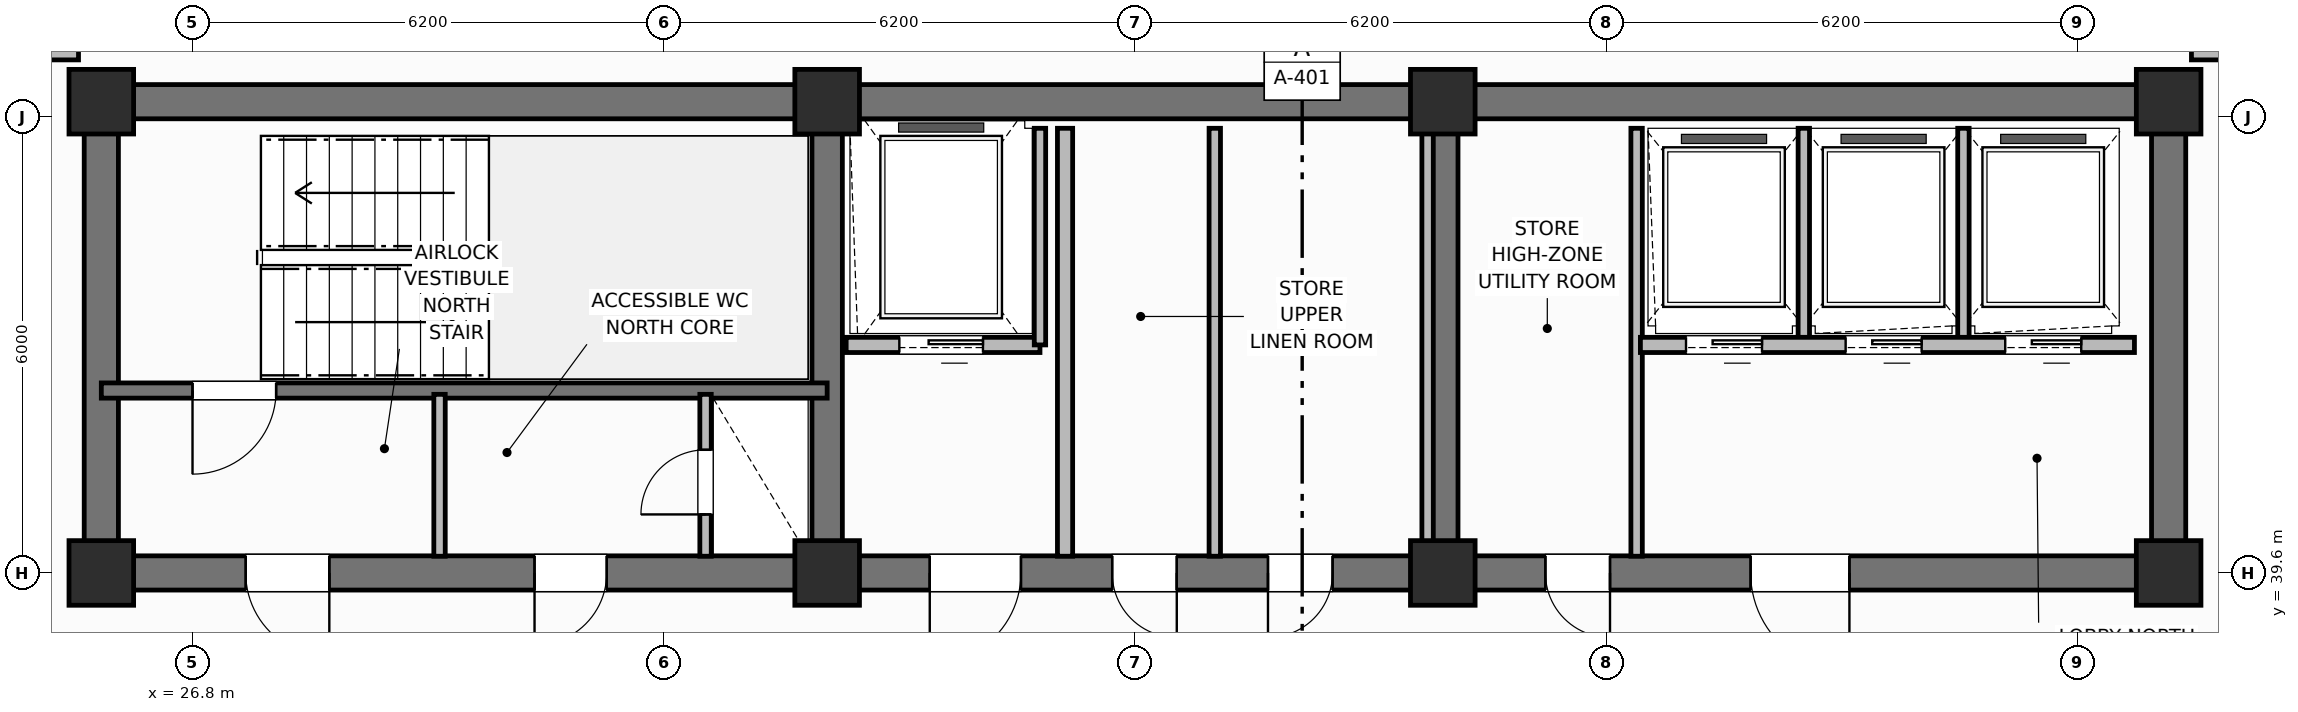
"""IFC4 building model, lengths in metres.
Left out: names, types, materials, properties, quantities, classifications, styles, units other than length and angle.
Written with IfcOpenShell. Run it as: python <this file> out.ifc"""

import sys

from ifc_helpers import new_model, si_unit, direction, frame, frame_2d, origin, origin_2d, place, context, subcontext, project, spatial, rectangle, extrude, element, fill, save


model = new_model("IFC4")
c1 = context("Model", 3, precision=1e-05, world=origin(), true_north=direction((0.0, 1.0)))
c2 = subcontext(c1, "Body", "Model", "MODEL_VIEW")
j1 = project(units=[si_unit("LENGTHUNIT", "METRE"), si_unit("PLANEANGLEUNIT", "RADIAN")], contexts=[c1])
p1 = place(None, origin())
s1 = spatial("IfcSite", under=j1, at=p1, CompositionType="ELEMENT")
p2 = place(p1, origin())
s2 = spatial("IfcBuilding", under=s1, at=p2, CompositionType="ELEMENT")
p3 = place(p2, frame((0.0, 0.0, 248.0)))
s3 = spatial("IfcBuildingStorey", under=s2, at=p3, CompositionType="ELEMENT", Elevation=248.0)
p4 = place(p3, frame((25.6, 45.8, 0.0), z_axis=(0.0, 0.0, 1.0), x_axis=(1.0, 0.0, 0.0)))
e1 = element("IfcWall", 1, at=p4, inside=s3, PredefinedType="SHEAR", context=c2, shape_type="SweptSolid", body=[
    extrude(rectangle(XDim=27.2, YDim=0.45, at=frame_2d((13.6, 0.0))), origin(), (0.0, 0.0, 1.0), 3.7),
])
for number, where, z_axis, x_axis in (
    (2, (25.6, 39.825, 0.0), (0.0, 0.0, 1.0), (0.0, 1.0, 0.0)),
    (3, (52.8, 39.825, 0.0), (0.0, 0.0, 1.0), (0.0, 1.0, 0.0)),
):
    element("IfcWall", number, at=place(p3, frame(where, z_axis=z_axis, x_axis=x_axis)), inside=s3, PredefinedType="SHEAR", context=c2, shape_type="SweptSolid", body=[
        extrude(rectangle(XDim=5.75, YDim=0.45, at=frame_2d((2.875, 0.0))), origin(), (0.0, 0.0, 1.0), 3.7),
    ])
p5 = place(p3, frame((52.8, 39.6, 0.0), z_axis=(0.0, 0.0, 1.0), x_axis=(-1.0, 0.0, 0.0)))
e4 = element("IfcWall", 4, at=p5, inside=s3, PredefinedType="SHEAR", context=c2, shape_type="SweptSolid", body=[
    extrude(rectangle(XDim=27.2, YDim=0.45, at=frame_2d((13.6, 0.0))), origin(), (0.0, 0.0, 1.0), 3.7),
])
p6 = place(p5, frame((24.2, 0.0, 0.0)))
e5 = element("IfcOpeningElement", 5, at=p6, cuts=e4, PredefinedType="OPENING", context=c2, shape_type="SweptSolid", body=[
    extrude(rectangle(XDim=1.1, YDim=2.15, at=frame_2d((0.55, 1.075))), frame((0.0, 0.235, 0.0), z_axis=(0.0, -1.0, 0.0), x_axis=(1.0, 0.0, 0.0)), (0.0, 0.0, 1.0), 0.47),
])
p7 = place(p5, frame((20.55, 0.0, 0.0)))
e6 = element("IfcOpeningElement", 6, at=p7, cuts=e4, PredefinedType="OPENING", context=c2, shape_type="SweptSolid", body=[
    extrude(rectangle(XDim=0.95, YDim=2.1, at=frame_2d((0.475, 1.05))), frame((0.0, 0.235, 0.0), z_axis=(0.0, -1.0, 0.0), x_axis=(1.0, 0.0, 0.0)), (0.0, 0.0, 1.0), 0.47),
])
p8 = place(p5, frame((15.1, 0.0, 0.0)))
e7 = element("IfcOpeningElement", 7, at=p8, cuts=e4, PredefinedType="OPENING", context=c2, shape_type="SweptSolid", body=[
    extrude(rectangle(XDim=1.2, YDim=2.15, at=frame_2d((0.6, 1.075))), frame((0.0, 0.235, 0.0), z_axis=(0.0, -1.0, 0.0), x_axis=(1.0, 0.0, 0.0)), (0.0, 0.0, 1.0), 0.47),
])
p9 = place(p5, frame((13.05, 0.0, 0.0)))
e8 = element("IfcOpeningElement", 8, at=p9, cuts=e4, PredefinedType="OPENING", context=c2, shape_type="SweptSolid", body=[
    extrude(rectangle(XDim=0.85, YDim=2.1, at=frame_2d((0.425, 1.05))), frame((0.0, 0.235, 0.0), z_axis=(0.0, -1.0, 0.0), x_axis=(1.0, 0.0, 0.0)), (0.0, 0.0, 1.0), 0.47),
])
p10 = place(p5, frame((11.0, 0.0, 0.0)))
e9 = element("IfcOpeningElement", 9, at=p10, cuts=e4, PredefinedType="OPENING", context=c2, shape_type="SweptSolid", body=[
    extrude(rectangle(XDim=0.85, YDim=2.1, at=frame_2d((0.425, 1.05))), frame((0.0, 0.235, 0.0), z_axis=(0.0, -1.0, 0.0), x_axis=(1.0, 0.0, 0.0)), (0.0, 0.0, 1.0), 0.47),
])
p11 = place(p5, frame((7.35, 0.0, 0.0)))
e10 = element("IfcOpeningElement", 10, at=p11, cuts=e4, PredefinedType="OPENING", context=c2, shape_type="SweptSolid", body=[
    extrude(rectangle(XDim=0.85, YDim=2.1, at=frame_2d((0.425, 1.05))), frame((0.0, 0.235, 0.0), z_axis=(0.0, -1.0, 0.0), x_axis=(1.0, 0.0, 0.0)), (0.0, 0.0, 1.0), 0.47),
])
p12 = place(p5, frame((4.2, 0.0, 0.0)))
e11 = element("IfcOpeningElement", 11, at=p12, cuts=e4, PredefinedType="OPENING", context=c2, shape_type="SweptSolid", body=[
    extrude(rectangle(XDim=1.3, YDim=2.2, at=frame_2d((0.65, 1.1))), frame((0.0, 0.235, 0.0), z_axis=(0.0, -1.0, 0.0), x_axis=(1.0, 0.0, 0.0)), (0.0, 0.0, 1.0), 0.47),
])
for number, where, z_axis, x_axis in (
    (12, (35.15, 39.825, 0.0), (0.0, 0.0, 1.0), (0.0, 1.0, 0.0)),
    (13, (43.25, 39.825, 0.0), (0.0, 0.0, 1.0), (0.0, 1.0, 0.0)),
):
    element("IfcWall", number, at=place(p3, frame(where, z_axis=z_axis, x_axis=x_axis)), inside=s3, PredefinedType="SHEAR", context=c2, shape_type="SweptSolid", body=[
        extrude(rectangle(XDim=5.75, YDim=0.4, at=frame_2d((2.875, 0.0))), origin(), (0.0, 0.0, 1.0), 3.7),
    ])
for number, where, z_axis, x_axis in (
    (14, (25.6, 39.6, 0.0), (0.0, 0.0, 1.0), (1.0, 0.0, 0.0)),
    (15, (25.6, 45.8, 0.0), (0.0, 0.0, 1.0), (1.0, 0.0, 0.0)),
    (16, (35.15, 39.6, 0.0), (0.0, 0.0, 1.0), (1.0, 0.0, 0.0)),
    (17, (35.15, 45.8, 0.0), (0.0, 0.0, 1.0), (1.0, 0.0, 0.0)),
    (18, (43.25, 39.6, 0.0), (0.0, 0.0, 1.0), (1.0, 0.0, 0.0)),
    (19, (43.25, 45.8, 0.0), (0.0, 0.0, 1.0), (1.0, 0.0, 0.0)),
    (20, (52.8, 39.6, 0.0), (0.0, 0.0, 1.0), (1.0, 0.0, 0.0)),
    (21, (52.8, 45.8, 0.0), (0.0, 0.0, 1.0), (1.0, 0.0, 0.0)),
):
    element("IfcColumn", number, at=place(p3, frame(where, z_axis=z_axis, x_axis=x_axis)), inside=s3, PredefinedType="COLUMN", context=c2, shape_type="SweptSolid", body=[
        extrude(rectangle(XDim=0.85, YDim=0.85, at=origin_2d()), origin(), (0.0, 0.0, 1.0), 3.7),
    ])
p13 = place(p3, frame((35.15, 42.0, 0.0), z_axis=(0.0, 0.0, 1.0), x_axis=(-1.0, 0.0, 0.0)))
e22 = element("IfcWall", 22, at=p13, inside=s3, PredefinedType="SHEAR", context=c2, shape_type="SweptSolid", body=[
    extrude(rectangle(XDim=9.55, YDim=0.2, at=frame_2d((4.775, 0.0))), origin(), (0.0, 0.0, 1.0), 3.7),
])
p14 = place(p13, frame((7.25, 0.0, 0.0)))
e23 = element("IfcOpeningElement", 23, at=p14, cuts=e22, PredefinedType="OPENING", context=c2, shape_type="SweptSolid", body=[
    extrude(rectangle(XDim=1.1, YDim=2.15, at=frame_2d((0.55, 1.075))), frame((0.0, 0.11, 0.0), z_axis=(0.0, -1.0, 0.0), x_axis=(1.0, 0.0, 0.0)), (0.0, 0.0, 1.0), 0.22),
])
p15 = place(p3, frame((33.55, 39.82, 0.0), z_axis=(0.0, 0.0, 1.0), x_axis=(0.0, 1.0, 0.0)))
e24 = element("IfcWall", 24, at=p15, inside=s3, PredefinedType="PARTITIONING", context=c2, shape_type="SweptSolid", body=[
    extrude(rectangle(XDim=2.13, YDim=0.15, at=frame_2d((1.065, 0.0))), origin(), (0.0, 0.0, 1.0), 2.56),
])
p16 = place(p15, frame((0.55, 0.0, 0.0)))
e25 = element("IfcOpeningElement", 25, at=p16, cuts=e24, PredefinedType="OPENING", context=c2, shape_type="SweptSolid", body=[
    extrude(rectangle(XDim=0.85, YDim=2.05, at=frame_2d((0.425, 1.025))), frame((0.0, 0.085, 0.0), z_axis=(0.0, -1.0, 0.0), x_axis=(1.0, 0.0, 0.0)), (0.0, 0.0, 1.0), 0.17),
])
p17 = place(p3, frame((30.05, 39.82, 0.0), z_axis=(0.0, 0.0, 1.0), x_axis=(0.0, 1.0, 0.0)))
e26 = element("IfcWall", 26, at=p17, inside=s3, PredefinedType="PARTITIONING", context=c2, shape_type="SweptSolid", body=[
    extrude(rectangle(XDim=2.13, YDim=0.15, at=frame_2d((1.065, 0.0))), origin(), (0.0, 0.0, 1.0), 2.56),
])
p18 = place(p3, frame((37.95, 42.6, 0.0), z_axis=(0.0, 0.0, 1.0), x_axis=(-1.0, 0.0, 0.0)))
e27 = element("IfcWall", 27, at=p18, inside=s3, PredefinedType="PARTITIONING", context=c2, shape_type="SweptSolid", body=[
    extrude(rectangle(XDim=2.55, YDim=0.2, at=frame_2d((1.275, 0.0))), origin(), (0.0, 0.0, 1.0), 2.33),
])
p19 = place(p18, frame((0.75, 0.0, 0.0)))
e28 = element("IfcOpeningElement", 28, at=p19, cuts=e27, PredefinedType="OPENING", context=c2, shape_type="SweptSolid", body=[
    extrude(rectangle(XDim=1.1, YDim=2.15, at=frame_2d((0.55, 1.075))), frame((0.0, 0.11, 0.0), z_axis=(0.0, -1.0, 0.0), x_axis=(1.0, 0.0, 0.0)), (0.0, 0.0, 1.0), 0.22),
])
p20 = place(p3, frame((37.95, 42.6, 0.0), z_axis=(0.0, 0.0, 1.0), x_axis=(0.0, 1.0, 0.0)))
e29 = element("IfcWall", 29, at=p20, inside=s3, PredefinedType="PARTITIONING", context=c2, shape_type="SweptSolid", body=[
    extrude(rectangle(XDim=2.85, YDim=0.15, at=frame_2d((1.425, 0.0))), origin(), (0.0, 0.0, 1.0), 2.56),
])
p21 = place(p3, frame((38.28, 39.82, 0.0), z_axis=(0.0, 0.0, 1.0), x_axis=(0.0, 1.0, 0.0)))
e30 = element("IfcWall", 30, at=p21, inside=s3, PredefinedType="PARTITIONING", context=c2, shape_type="SweptSolid", body=[
    extrude(rectangle(XDim=5.63, YDim=0.2, at=frame_2d((2.815, 0.0))), origin(), (0.0, 0.0, 1.0), 2.56),
])
for number, where, z_axis, x_axis in (
    (31, (43.05, 39.82, 0.0), (0.0, 0.0, 1.0), (0.0, 1.0, 0.0)),
    (32, (40.25, 39.82, 0.0), (0.0, 0.0, 1.0), (0.0, 1.0, 0.0)),
    (33, (45.8, 39.82, 0.0), (0.0, 0.0, 1.0), (0.0, 1.0, 0.0)),
):
    element("IfcWall", number, at=place(p3, frame(where, z_axis=z_axis, x_axis=x_axis)), inside=s3, PredefinedType="PARTITIONING", context=c2, shape_type="SweptSolid", body=[
        extrude(rectangle(XDim=5.63, YDim=0.15, at=frame_2d((2.815, 0.0))), origin(), (0.0, 0.0, 1.0), 2.56),
    ])
for number, where, z_axis, x_axis in (
    (34, (48.0, 42.65, 0.0), (0.0, 0.0, 1.0), (0.0, 1.0, 0.0)),
    (35, (50.1, 42.65, 0.0), (0.0, 0.0, 1.0), (0.0, 1.0, 0.0)),
):
    element("IfcWall", number, at=place(p3, frame(where, z_axis=z_axis, x_axis=x_axis)), inside=s3, PredefinedType="PARTITIONING", context=c2, shape_type="SweptSolid", body=[
        extrude(rectangle(XDim=2.8, YDim=0.15, at=frame_2d((1.4, 0.0))), origin(), (0.0, 0.0, 1.0), 2.56),
    ])
p22 = place(p3, frame((52.35, 42.6, 0.0), z_axis=(0.0, 0.0, 1.0), x_axis=(-1.0, 0.0, 0.0)))
e36 = element("IfcWall", 36, at=p22, inside=s3, PredefinedType="PARTITIONING", context=c2, shape_type="SweptSolid", body=[
    extrude(rectangle(XDim=6.5, YDim=0.2, at=frame_2d((3.25, 0.0))), origin(), (0.0, 0.0, 1.0), 2.56),
])
p23 = place(p22, frame((4.9, 0.0, 0.0)))
e37 = element("IfcOpeningElement", 37, at=p23, cuts=e36, PredefinedType="OPENING", context=c2, shape_type="SweptSolid", body=[
    extrude(rectangle(XDim=1.0, YDim=2.15, at=frame_2d((0.5, 1.075))), frame((0.0, 0.11, 0.0), z_axis=(0.0, -1.0, 0.0), x_axis=(1.0, 0.0, 0.0)), (0.0, 0.0, 1.0), 0.22),
])
p24 = place(p22, frame((2.8, 0.0, 0.0)))
e38 = element("IfcOpeningElement", 38, at=p24, cuts=e36, PredefinedType="OPENING", context=c2, shape_type="SweptSolid", body=[
    extrude(rectangle(XDim=1.0, YDim=2.15, at=frame_2d((0.5, 1.075))), frame((0.0, 0.11, 0.0), z_axis=(0.0, -1.0, 0.0), x_axis=(1.0, 0.0, 0.0)), (0.0, 0.0, 1.0), 0.22),
])
p25 = place(p22, frame((0.7, 0.0, 0.0)))
e39 = element("IfcOpeningElement", 39, at=p25, cuts=e36, PredefinedType="OPENING", context=c2, shape_type="SweptSolid", body=[
    extrude(rectangle(XDim=1.0, YDim=2.15, at=frame_2d((0.5, 1.075))), frame((0.0, 0.11, 0.0), z_axis=(0.0, -1.0, 0.0), x_axis=(1.0, 0.0, 0.0)), (0.0, 0.0, 1.0), 0.22),
])
p26 = place(p3, frame((21.546, 46.45, 0.0), z_axis=(0.0, 0.0, 1.0), x_axis=(1.0, 0.0, 0.0)))
e40 = element("IfcWall", 40, at=p26, inside=s3, PredefinedType="PARTITIONING", context=c2, shape_type="SweptSolid", body=[
    extrude(rectangle(XDim=3.754, YDim=0.2, at=frame_2d((1.877, 0.0))), origin(), (0.0, 0.0, 1.0), 2.56),
])
p27 = place(p3, frame((53.1, 46.45, 0.0), z_axis=(0.0, 0.0, 1.0), x_axis=(1.0, 0.0, 0.0)))
e41 = element("IfcWall", 41, at=p27, inside=s3, PredefinedType="PARTITIONING", context=c2, shape_type="SweptSolid", body=[
    extrude(rectangle(XDim=3.754, YDim=0.2, at=frame_2d((1.877, 0.0))), origin(), (0.0, 0.0, 1.0), 2.56),
])
p28 = place(p14, origin())
e42 = element("IfcDoor", 42, at=p28, inside=s3, OperationType="SINGLE_SWING_RIGHT", PredefinedType="DOOR", context=c2, shape_type="SweptSolid", body=[
    extrude(rectangle(XDim=1.1, YDim=2.15, at=frame_2d((0.55, 1.075))), frame((0.0, 0.025, 0.0), z_axis=(0.0, -1.0, 0.0), x_axis=(1.0, 0.0, 0.0)), (0.0, 0.0, 1.0), 0.05),
])
fill(e23, e42)
p29 = place(p16, origin())
e43 = element("IfcDoor", 43, at=p29, inside=s3, OperationType="SINGLE_SWING_LEFT", PredefinedType="TRAPDOOR", context=c2, shape_type="SweptSolid", body=[
    extrude(rectangle(XDim=0.85, YDim=2.05, at=frame_2d((0.425, 1.025))), frame((0.0, 0.025, 0.0), z_axis=(0.0, -1.0, 0.0), x_axis=(1.0, 0.0, 0.0)), (0.0, 0.0, 1.0), 0.05),
])
fill(e25, e43)
p30 = place(p19, origin())
e44 = element("IfcDoor", 44, at=p30, inside=s3, OperationType="SLIDING_TO_LEFT", PredefinedType="DOOR", context=c2, shape_type="SweptSolid", body=[
    extrude(rectangle(XDim=1.1, YDim=2.15, at=frame_2d((0.55, 1.075))), frame((0.0, 0.025, 0.0), z_axis=(0.0, -1.0, 0.0), x_axis=(1.0, 0.0, 0.0)), (0.0, 0.0, 1.0), 0.05),
])
fill(e28, e44)
p31 = place(p23, origin())
e45 = element("IfcDoor", 45, at=p31, inside=s3, OperationType="SLIDING_TO_LEFT", PredefinedType="DOOR", context=c2, shape_type="SweptSolid", body=[
    extrude(rectangle(XDim=1.0, YDim=2.15, at=frame_2d((0.5, 1.075))), frame((0.0, 0.025, 0.0), z_axis=(0.0, -1.0, 0.0), x_axis=(1.0, 0.0, 0.0)), (0.0, 0.0, 1.0), 0.05),
])
fill(e37, e45)
p32 = place(p24, origin())
e46 = element("IfcDoor", 46, at=p32, inside=s3, OperationType="SLIDING_TO_LEFT", PredefinedType="DOOR", context=c2, shape_type="SweptSolid", body=[
    extrude(rectangle(XDim=1.0, YDim=2.15, at=frame_2d((0.5, 1.075))), frame((0.0, 0.025, 0.0), z_axis=(0.0, -1.0, 0.0), x_axis=(1.0, 0.0, 0.0)), (0.0, 0.0, 1.0), 0.05),
])
fill(e38, e46)
p33 = place(p25, origin())
e47 = element("IfcDoor", 47, at=p33, inside=s3, OperationType="SLIDING_TO_LEFT", PredefinedType="DOOR", context=c2, shape_type="SweptSolid", body=[
    extrude(rectangle(XDim=1.0, YDim=2.15, at=frame_2d((0.5, 1.075))), frame((0.0, 0.025, 0.0), z_axis=(0.0, -1.0, 0.0), x_axis=(1.0, 0.0, 0.0)), (0.0, 0.0, 1.0), 0.05),
])
fill(e39, e47)
p34 = place(p6, origin())
e48 = element("IfcDoor", 48, at=p34, inside=s3, OperationType="SINGLE_SWING_LEFT", PredefinedType="DOOR", context=c2, shape_type="SweptSolid", body=[
    extrude(rectangle(XDim=1.1, YDim=2.15, at=frame_2d((0.55, 1.075))), frame((0.0, 0.025, 0.0), z_axis=(0.0, -1.0, 0.0), x_axis=(1.0, 0.0, 0.0)), (0.0, 0.0, 1.0), 0.05),
])
fill(e5, e48)
p35 = place(p7, origin())
e49 = element("IfcDoor", 49, at=p35, inside=s3, OperationType="SINGLE_SWING_RIGHT", PredefinedType="DOOR", context=c2, shape_type="SweptSolid", body=[
    extrude(rectangle(XDim=0.95, YDim=2.1, at=frame_2d((0.475, 1.05))), frame((0.0, 0.025, 0.0), z_axis=(0.0, -1.0, 0.0), x_axis=(1.0, 0.0, 0.0)), (0.0, 0.0, 1.0), 0.05),
])
fill(e6, e49)
p36 = place(p8, origin())
e50 = element("IfcDoor", 50, at=p36, inside=s3, OperationType="SINGLE_SWING_RIGHT", PredefinedType="DOOR", context=c2, shape_type="SweptSolid", body=[
    extrude(rectangle(XDim=1.2, YDim=2.15, at=frame_2d((0.6, 1.075))), frame((0.0, 0.025, 0.0), z_axis=(0.0, -1.0, 0.0), x_axis=(1.0, 0.0, 0.0)), (0.0, 0.0, 1.0), 0.05),
])
fill(e7, e50)
p37 = place(p9, origin())
e51 = element("IfcDoor", 51, at=p37, inside=s3, OperationType="SINGLE_SWING_LEFT", PredefinedType="DOOR", context=c2, shape_type="SweptSolid", body=[
    extrude(rectangle(XDim=0.85, YDim=2.1, at=frame_2d((0.425, 1.05))), frame((0.0, 0.025, 0.0), z_axis=(0.0, -1.0, 0.0), x_axis=(1.0, 0.0, 0.0)), (0.0, 0.0, 1.0), 0.05),
])
fill(e8, e51)
p38 = place(p10, origin())
e52 = element("IfcDoor", 52, at=p38, inside=s3, OperationType="SINGLE_SWING_RIGHT", PredefinedType="DOOR", context=c2, shape_type="SweptSolid", body=[
    extrude(rectangle(XDim=0.85, YDim=2.1, at=frame_2d((0.425, 1.05))), frame((0.0, 0.025, 0.0), z_axis=(0.0, -1.0, 0.0), x_axis=(1.0, 0.0, 0.0)), (0.0, 0.0, 1.0), 0.05),
])
fill(e9, e52)
p39 = place(p11, origin())
e53 = element("IfcDoor", 53, at=p39, inside=s3, OperationType="SINGLE_SWING_LEFT", PredefinedType="DOOR", context=c2, shape_type="SweptSolid", body=[
    extrude(rectangle(XDim=0.85, YDim=2.1, at=frame_2d((0.425, 1.05))), frame((0.0, 0.025, 0.0), z_axis=(0.0, -1.0, 0.0), x_axis=(1.0, 0.0, 0.0)), (0.0, 0.0, 1.0), 0.05),
])
fill(e10, e53)
p40 = place(p12, origin())
e54 = element("IfcDoor", 54, at=p40, inside=s3, OperationType="SINGLE_SWING_LEFT", PredefinedType="DOOR", context=c2, shape_type="SweptSolid", body=[
    extrude(rectangle(XDim=1.3, YDim=2.2, at=frame_2d((0.65, 1.1))), frame((0.0, 0.025, 0.0), z_axis=(0.0, -1.0, 0.0), x_axis=(1.0, 0.0, 0.0)), (0.0, 0.0, 1.0), 0.05),
])
fill(e11, e54)
save(model, sys.argv[1])
